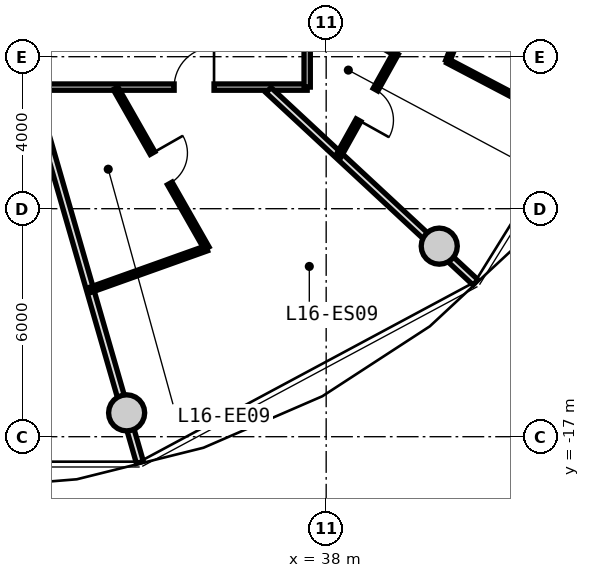
"""IFC4 building model, lengths in metres.
Left out: names, types, materials, properties, quantities, classifications, styles, units other than length and angle.
Written with IfcOpenShell. Run it as: python <this file> out.ifc"""

import sys

from ifc_helpers import new_model, si_unit, direction, frame, frame_2d, origin, origin_2d, place, context, subcontext, project, spatial, rectangle, circle, extrude, source, transform, mapped, element, fill, save


model = new_model("IFC4")
c1 = context("Model", 3, precision=1e-05, world=origin(), true_north=direction((0.0, 1.0)))
c2 = subcontext(c1, "Body", "Model", "MODEL_VIEW")
j1 = project(units=[si_unit("LENGTHUNIT", "METRE"), si_unit("PLANEANGLEUNIT", "RADIAN")], contexts=[c1])
p1 = place(None, origin())
s1 = spatial("IfcSite", under=j1, at=p1, CompositionType="ELEMENT")
p2 = place(p1, origin())
s2 = spatial("IfcBuilding", under=s1, at=p2, CompositionType="ELEMENT")
p3 = place(p2, frame((0.0, 0.0, 55.15)))
s3 = spatial("IfcBuildingStorey", under=s2, at=p3, CompositionType="ELEMENT", Elevation=55.15)
m1 = source(origin(), c2, "Body", "SweptSolid", [
    extrude(circle(Radius=0.475, at=origin_2d()), origin(), (0.0, 0.0, 1.0), 3.05),
])
for number, where, z_axis, x_axis in (
    (1, (32.749, -16.373, 0.0), (0.0, 0.0, 1.0), (1.0, 0.0, 0.0)),
    (2, (40.975, -11.985, 0.0), (0.0, 0.0, 1.0), (1.0, 0.0, 0.0)),
):
    element("IfcColumn", number, at=place(p3, frame(where, z_axis=z_axis, x_axis=x_axis)), inside=s3, PredefinedType="COLUMN", context=c2, shape_type="MappedRepresentation", body=[
        mapped(m1, transform((0.0, 0.0, 0.0), x_axis=(1.0, 0.0, 0.0), y_axis=(0.0, 1.0, 0.0), z_axis=(0.0, 0.0, 1.0), scale=1.0)),
    ])
m2 = source(origin(), c2, "Body", "SweptSolid", [
    extrude(rectangle(XDim=19.0, YDim=0.165, at=frame_2d((9.5, 0.0))), origin(), (0.0, 0.0, 1.0), 2.775),
])
p4 = place(p3, frame((37.5, -7.8, 0.0), z_axis=(0.0, 0.0, 1.0), x_axis=(-1.0, 0.0, 0.0)))
e3 = element("IfcWall", 3, at=p4, inside=s3, PredefinedType="PARTITIONING", context=c2, shape_type="MappedRepresentation", body=[
    mapped(m2, transform((0.0, 0.0, 0.0), x_axis=(1.0, 0.0, 0.0), y_axis=(0.0, 1.0, 0.0), z_axis=(0.0, 0.0, 1.0), scale=1.0)),
])
p5 = place(p4, frame((12.706, 0.0, 0.0)))
e4 = element("IfcOpeningElement", 4, at=p5, cuts=e3, PredefinedType="OPENING", context=c2, shape_type="SweptSolid", body=[
    extrude(rectangle(XDim=1.05, YDim=2.15, at=frame_2d((0.525, 1.075))), frame((0.0, 0.093, 0.0), z_axis=(0.0, -1.0, 0.0), x_axis=(1.0, 0.0, 0.0)), (0.0, 0.0, 1.0), 0.185),
])
p6 = place(p4, frame((7.959, 0.0, 0.0)))
e5 = element("IfcOpeningElement", 5, at=p6, cuts=e3, PredefinedType="OPENING", context=c2, shape_type="SweptSolid", body=[
    extrude(rectangle(XDim=1.05, YDim=2.15, at=frame_2d((0.525, 1.075))), frame((0.0, 0.093, 0.0), z_axis=(0.0, -1.0, 0.0), x_axis=(1.0, 0.0, 0.0)), (0.0, 0.0, 1.0), 0.185),
])
p7 = place(p4, frame((2.451, 0.0, 0.0)))
e6 = element("IfcOpeningElement", 6, at=p7, cuts=e3, PredefinedType="OPENING", context=c2, shape_type="SweptSolid", body=[
    extrude(rectangle(XDim=1.05, YDim=2.15, at=frame_2d((0.525, 1.075))), frame((0.0, 0.093, 0.0), z_axis=(0.0, -1.0, 0.0), x_axis=(1.0, 0.0, 0.0)), (0.0, 0.0, 1.0), 0.185),
])
m3 = source(origin(), c2, "Body", "SweptSolid", [
    extrude(rectangle(XDim=15.6, YDim=0.165, at=frame_2d((7.8, 0.0))), origin(), (0.0, 0.0, 1.0), 2.775),
])
p8 = place(p3, frame((37.5, 7.8, 0.0), z_axis=(0.0, 0.0, 1.0), x_axis=(0.0, -1.0, 0.0)))
e7 = element("IfcWall", 7, at=p8, inside=s3, PredefinedType="PARTITIONING", context=c2, shape_type="MappedRepresentation", body=[
    mapped(m3, transform((0.0, 0.0, 0.0), x_axis=(1.0, 0.0, 0.0), y_axis=(0.0, 1.0, 0.0), z_axis=(0.0, 0.0, 1.0), scale=1.0)),
])
p9 = place(p8, frame((8.835, 0.0, 0.0)))
e8 = element("IfcOpeningElement", 8, at=p9, cuts=e7, PredefinedType="OPENING", context=c2, shape_type="SweptSolid", body=[
    extrude(rectangle(XDim=1.05, YDim=2.15, at=frame_2d((0.525, 1.075))), frame((0.0, 0.093, 0.0), z_axis=(0.0, -1.0, 0.0), x_axis=(1.0, 0.0, 0.0)), (0.0, 0.0, 1.0), 0.185),
])
p10 = place(p8, frame((2.208, 0.0, 0.0)))
e9 = element("IfcOpeningElement", 9, at=p10, cuts=e7, PredefinedType="OPENING", context=c2, shape_type="SweptSolid", body=[
    extrude(rectangle(XDim=1.25, YDim=2.2, at=frame_2d((0.625, 1.1))), frame((0.0, 0.093, 0.0), z_axis=(0.0, -1.0, 0.0), x_axis=(1.0, 0.0, 0.0)), (0.0, 0.0, 1.0), 0.185),
])
m4 = source(origin(), c2, "Body", "SweptSolid", [
    extrude(rectangle(XDim=10.196, YDim=0.19, at=frame_2d((5.098, 0.0))), origin(), (0.0, 0.0, 1.0), 2.225),
])
p11 = place(p3, frame((30.273, -7.88, 0.0), z_axis=(0.0, 0.0, 1.0), x_axis=(0.277136420347, -0.960830580549, 0.0)))
e10 = element("IfcWall", 10, at=p11, inside=s3, PredefinedType="PARTITIONING", context=c2, shape_type="MappedRepresentation", body=[
    mapped(m4, transform((0.0, 0.0, 0.0), x_axis=(1.0, 0.0, 0.0), y_axis=(0.0, 1.0, 0.0), z_axis=(0.0, 0.0, 1.0), scale=1.0)),
])
m5 = source(origin(), c2, "Body", "SweptSolid", [
    extrude(rectangle(XDim=7.435, YDim=0.19, at=frame_2d((3.717, 0.0))), origin(), (0.0, 0.0, 1.0), 2.225),
])
p12 = place(p3, frame((36.483, -7.88, 0.0), z_axis=(0.0, 0.0, 1.0), x_axis=(0.732651956848, -0.680603489652, 0.0)))
e11 = element("IfcWall", 11, at=p12, inside=s3, PredefinedType="PARTITIONING", context=c2, shape_type="MappedRepresentation", body=[
    mapped(m5, transform((0.0, 0.0, 0.0), x_axis=(1.0, 0.0, 0.0), y_axis=(0.0, 1.0, 0.0), z_axis=(0.0, 0.0, 1.0), scale=1.0)),
])
m6 = source(origin(), c2, "Body", "SweptSolid", [
    extrude(rectangle(XDim=4.846, YDim=0.14, at=frame_2d((2.423, 0.0))), origin(), (0.0, 0.0, 1.0), 2.775),
])
p13 = place(p3, frame((32.458, -7.83, 0.0), z_axis=(0.0, 0.0, 1.0), x_axis=(0.494841788743, -0.868983086207, 0.0)))
e12 = element("IfcWall", 12, at=p13, inside=s3, PredefinedType="PARTITIONING", context=c2, shape_type="MappedRepresentation", body=[
    mapped(m6, transform((0.0, 0.0, 0.0), x_axis=(1.0, 0.0, 0.0), y_axis=(0.0, 1.0, 0.0), z_axis=(0.0, 0.0, 1.0), scale=1.0)),
])
p14 = place(p13, frame((1.963, 0.0, 0.0)))
e13 = element("IfcOpeningElement", 13, at=p14, cuts=e12, PredefinedType="OPENING", context=c2, shape_type="SweptSolid", body=[
    extrude(rectangle(XDim=0.92, YDim=2.1, at=frame_2d((0.46, 1.05))), frame((0.0, 0.08, 0.0), z_axis=(0.0, -1.0, 0.0), x_axis=(1.0, 0.0, 0.0)), (0.0, 0.0, 1.0), 0.16),
])
m7 = source(origin(), c2, "Body", "SweptSolid", [
    extrude(rectangle(XDim=3.276, YDim=0.14, at=frame_2d((1.638, 0.0))), origin(), (0.0, 0.0, 1.0), 2.415),
])
p15 = place(p3, frame((34.857, -12.042, 0.0), z_axis=(0.0, 0.0, 1.0), x_axis=(-0.94174696961, -0.336322234221, 0.0)))
e14 = element("IfcWall", 14, at=p15, inside=s3, PredefinedType="PARTITIONING", context=c2, shape_type="MappedRepresentation", body=[
    mapped(m7, transform((0.0, 0.0, 0.0), x_axis=(1.0, 0.0, 0.0), y_axis=(0.0, 1.0, 0.0), z_axis=(0.0, 0.0, 1.0), scale=1.0)),
])
m8 = source(origin(), c2, "Body", "SweptSolid", [
    extrude(rectangle(XDim=2.669, YDim=0.14, at=frame_2d((1.335, 0.0))), origin(), (0.0, 0.0, 1.0), 2.775),
])
p16 = place(p3, frame((37.53, -5.561, 0.0), z_axis=(0.0, 0.0, 1.0), x_axis=(0.86369928178, -0.50400749067, 0.0)))
e15 = element("IfcWall", 15, at=p16, inside=s3, PredefinedType="PARTITIONING", context=c2, shape_type="MappedRepresentation", body=[
    mapped(m8, transform((0.0, 0.0, 0.0), x_axis=(1.0, 0.0, 0.0), y_axis=(0.0, 1.0, 0.0), z_axis=(0.0, 0.0, 1.0), scale=1.0)),
])
m9 = source(origin(), c2, "Body", "SweptSolid", [
    extrude(rectangle(XDim=3.121, YDim=0.14, at=frame_2d((1.561, 0.0))), origin(), (0.0, 0.0, 1.0), 2.775),
])
p17 = place(p3, frame((39.836, -6.906, 0.0), z_axis=(0.0, 0.0, 1.0), x_axis=(-0.487302357327, -0.873233309342, 0.0)))
e16 = element("IfcWall", 16, at=p17, inside=s3, PredefinedType="PARTITIONING", context=c2, shape_type="MappedRepresentation", body=[
    mapped(m9, transform((0.0, 0.0, 0.0), x_axis=(1.0, 0.0, 0.0), y_axis=(0.0, 1.0, 0.0), z_axis=(0.0, 0.0, 1.0), scale=1.0)),
])
p18 = place(p17, frame((1.101, 0.0, 0.0)))
e17 = element("IfcOpeningElement", 17, at=p18, cuts=e16, PredefinedType="OPENING", context=c2, shape_type="SweptSolid", body=[
    extrude(rectangle(XDim=0.92, YDim=2.1, at=frame_2d((0.46, 1.05))), frame((0.0, 0.08, 0.0), z_axis=(0.0, -1.0, 0.0), x_axis=(1.0, 0.0, 0.0)), (0.0, 0.0, 1.0), 0.16),
])
m10 = source(origin(), c2, "Body", "SweptSolid", [
    extrude(rectangle(XDim=3.706, YDim=0.115, at=frame_2d((1.853, 0.0))), origin(), (0.0, 0.0, 1.0), 2.775),
])
p19 = place(p3, frame((41.198, -7.115, 0.0), z_axis=(0.0, 0.0, 1.0), x_axis=(0.88538502503, -0.464858427322, 0.0)))
e18 = element("IfcWall", 18, at=p19, inside=s3, PredefinedType="PARTITIONING", context=c2, shape_type="MappedRepresentation", body=[
    mapped(m10, transform((0.0, 0.0, 0.0), x_axis=(1.0, 0.0, 0.0), y_axis=(0.0, 1.0, 0.0), z_axis=(0.0, 0.0, 1.0), scale=1.0)),
])
m11 = source(origin(), c2, "Body", "SweptSolid", [
    extrude(rectangle(XDim=3.729, YDim=0.115, at=frame_2d((1.864, 0.0))), origin(), (0.0, 0.0, 1.0), 2.775),
])
p20 = place(p3, frame((41.198, -7.115, 0.0), z_axis=(0.0, 0.0, 1.0), x_axis=(0.363055991464, 0.93176732453, 0.0)))
e19 = element("IfcWall", 19, at=p20, inside=s3, PredefinedType="PARTITIONING", context=c2, shape_type="MappedRepresentation", body=[
    mapped(m11, transform((0.0, 0.0, 0.0), x_axis=(1.0, 0.0, 0.0), y_axis=(0.0, 1.0, 0.0), z_axis=(0.0, 0.0, 1.0), scale=1.0)),
])
p21 = place(p20, frame((1.389, 0.0, 0.0)))
e20 = element("IfcOpeningElement", 20, at=p21, cuts=e19, PredefinedType="OPENING", context=c2, shape_type="SweptSolid", body=[
    extrude(rectangle(XDim=0.95, YDim=2.1, at=frame_2d((0.475, 1.05))), frame((0.0, 0.067, 0.0), z_axis=(0.0, -1.0, 0.0), x_axis=(1.0, 0.0, 0.0)), (0.0, 0.0, 1.0), 0.135),
])
m12 = source(origin(), c2, "Body", "SweptSolid", [
    extrude(rectangle(XDim=1.05, YDim=2.15, at=frame_2d((0.525, 1.075))), frame((0.0, 0.025, 0.0), z_axis=(0.0, -1.0, 0.0), x_axis=(1.0, 0.0, 0.0)), (0.0, 0.0, 1.0), 0.05),
])
p22 = place(p7, frame((1.05, 0.0, 0.0), z_axis=(0.0, 0.0, 1.0), x_axis=(-1.0, 0.0, 0.0)))
e21 = element("IfcDoor", 21, at=p22, inside=s3, OperationType="SINGLE_SWING_RIGHT", PredefinedType="DOOR", context=c2, shape_type="MappedRepresentation", body=[
    mapped(m12, transform((0.0, 0.0, 0.0), x_axis=(1.0, 0.0, 0.0), y_axis=(0.0, 1.0, 0.0), z_axis=(0.0, 0.0, 1.0), scale=1.0)),
])
fill(e6, e21)
m13 = source(origin(), c2, "Body", "SweptSolid", [
    extrude(rectangle(XDim=0.92, YDim=2.1, at=frame_2d((0.46, 1.05))), frame((0.0, 0.025, 0.0), z_axis=(0.0, -1.0, 0.0), x_axis=(1.0, 0.0, 0.0)), (0.0, 0.0, 1.0), 0.05),
])
p23 = place(p14, origin())
e22 = element("IfcDoor", 22, at=p23, inside=s3, OperationType="SINGLE_SWING_LEFT", PredefinedType="DOOR", context=c2, shape_type="MappedRepresentation", body=[
    mapped(m13, transform((0.0, 0.0, 0.0), x_axis=(1.0, 0.0, 0.0), y_axis=(0.0, 1.0, 0.0), z_axis=(0.0, 0.0, 1.0), scale=1.0)),
])
fill(e13, e22)
p24 = place(p18, origin())
e23 = element("IfcDoor", 23, at=p24, inside=s3, OperationType="SINGLE_SWING_RIGHT", PredefinedType="DOOR", context=c2, shape_type="MappedRepresentation", body=[
    mapped(m13, transform((0.0, 0.0, 0.0), x_axis=(1.0, 0.0, 0.0), y_axis=(0.0, 1.0, 0.0), z_axis=(0.0, 0.0, 1.0), scale=1.0)),
])
fill(e17, e23)
save(model, sys.argv[1])
